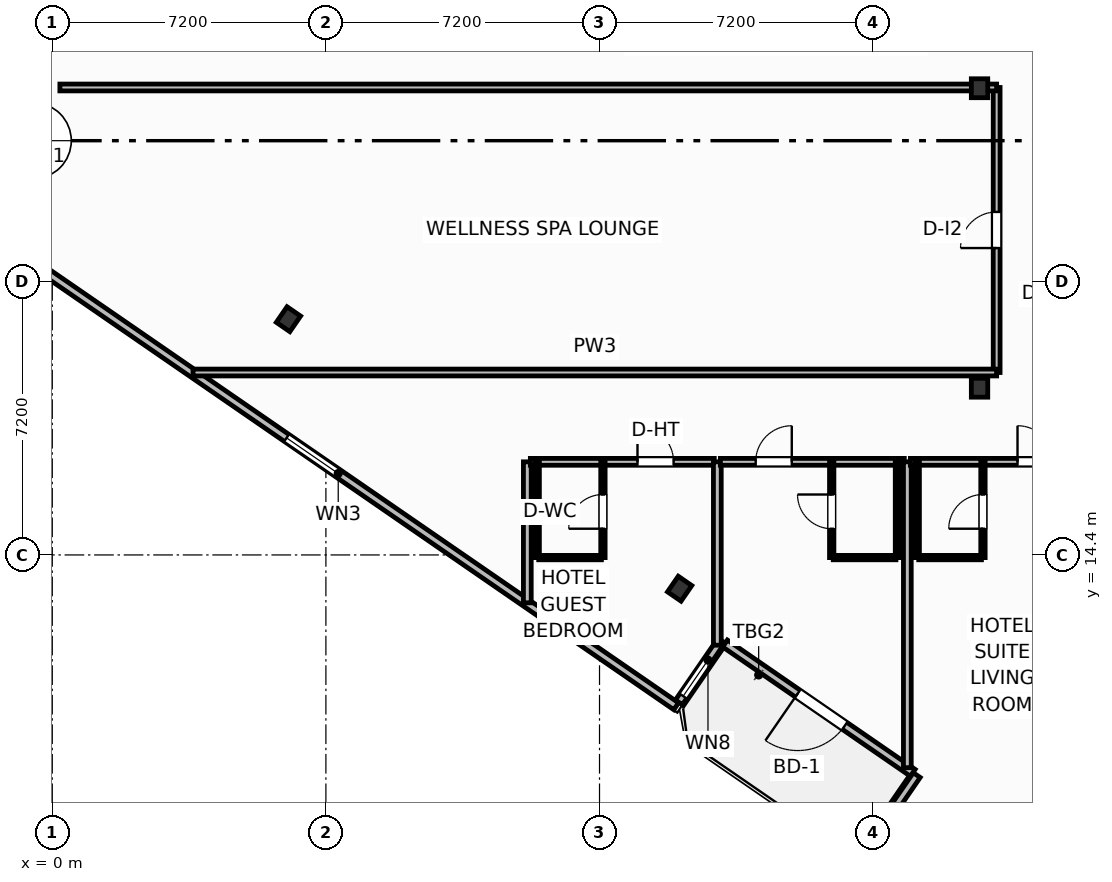
"""IFC4 building model, lengths in metres.
Left out: names, types, materials, properties, quantities, classifications, styles, units other than length and angle.
Written with IfcOpenShell. Run it as: python <this file> out.ifc"""

import sys

from ifc_helpers import new_model, si_unit, direction, frame, frame_2d, origin, origin_2d, place, context, subcontext, project, spatial, rectangle, i_section, extrude, element, fill, save


model = new_model("IFC4")
c1 = context("Model", 3, precision=1e-05, world=origin(), true_north=direction((0.0, 1.0)))
c2 = subcontext(c1, "Body", "Model", "MODEL_VIEW")
j1 = project(units=[si_unit("LENGTHUNIT", "METRE"), si_unit("PLANEANGLEUNIT", "RADIAN")], contexts=[c1])
p1 = place(None, origin())
s1 = spatial("IfcSite", under=j1, at=p1, CompositionType="ELEMENT")
p2 = place(p1, origin())
s2 = spatial("IfcBuilding", under=s1, at=p2, CompositionType="ELEMENT")
p3 = place(p2, frame((0.0, 0.0, 27.0)))
s3 = spatial("IfcBuildingStorey", under=s2, at=p3, CompositionType="ELEMENT", Elevation=27.0)
for number, where, z_axis, x_axis in (
    (1, (24.4, 18.8, 0.0), (0.0, 0.0, 1.0), (1.0, 0.0, 0.0)),
    (2, (24.4, 26.68, 0.0), (0.0, 0.0, 1.0), (1.0, 0.0, 0.0)),
):
    element("IfcColumn", number, at=place(p3, frame(where, z_axis=z_axis, x_axis=x_axis)), inside=s3, PredefinedType="COLUMN", context=c2, shape_type="SweptSolid", body=[
        extrude(i_section(OverallWidth=0.432, OverallDepth=0.498, WebThickness=0.056, FlangeThickness=0.089, FilletRadius=0.025, at=origin_2d()), origin(), (0.0, 0.0, 1.0), 3.7),
    ])
for number, where, z_axis, x_axis in (
    (3, (6.215, 20.603, -0.25), (0.0, 0.0, 1.0), (0.824, -0.567, 0.0)),
    (4, (16.509, 13.512, -0.25), (0.0, 0.0, 1.0), (0.824, -0.567, 0.0)),
):
    element("IfcColumn", number, at=place(p3, frame(where, z_axis=z_axis, x_axis=x_axis)), inside=s3, PredefinedType="COLUMN", context=c2, shape_type="SweptSolid", body=[
        extrude(i_section(OverallWidth=0.432, OverallDepth=0.498, WebThickness=0.056, FlangeThickness=0.089, FilletRadius=0.025, at=origin_2d()), origin(), (0.0, 0.0, 1.0), 3.95),
    ])
p4 = place(p3, frame((22.643, 8.667, 0.0), z_axis=(0.0, 0.0, 1.0), x_axis=(-0.823534636215, 0.567265989598, 0.0)))
e5 = element("IfcWall", 5, at=p4, inside=s3, PredefinedType="SOLIDWALL", context=c2, shape_type="SweptSolid", body=[
    extrude(rectangle(XDim=6.0, YDim=0.22, at=frame_2d((3.0, 0.0))), origin(), (0.0, 0.0, 1.0), 2.73),
])
p5 = place(p4, frame((2.176, 0.0, 0.0)))
e6 = element("IfcOpeningElement", 6, at=p5, cuts=e5, PredefinedType="OPENING", context=c2, shape_type="SweptSolid", body=[
    extrude(rectangle(XDim=1.5, YDim=2.25, at=frame_2d((0.75, 1.125))), frame((0.0, 0.12, 0.0), z_axis=(0.0, -1.0, 0.0), x_axis=(1.0, 0.0, 0.0)), (0.0, 0.0, 1.0), 0.24),
])
p6 = place(p3, frame((-2.728, 23.605, 0.0), z_axis=(0.0, 0.0, 1.0), x_axis=(0.823535075462, -0.567265351915, 0.0)))
e7 = element("IfcWall", 7, at=p6, inside=s3, PredefinedType="SOLIDWALL", context=c2, shape_type="SweptSolid", body=[
    extrude(rectangle(XDim=23.247, YDim=0.22, at=frame_2d((11.624, 0.0))), origin(), (0.0, 0.0, 1.0), 2.73),
])
p7 = place(p6, frame((10.799, 0.0, 0.8)))
e8 = element("IfcOpeningElement", 8, at=p7, cuts=e7, PredefinedType="OPENING", context=c2, shape_type="SweptSolid", body=[
    extrude(rectangle(XDim=1.65, YDim=1.65, at=frame_2d((0.825, 0.825))), frame((0.0, 0.12, 0.0), z_axis=(0.0, -1.0, 0.0), x_axis=(1.0, 0.0, 0.0)), (0.0, 0.0, 1.0), 0.24),
])
p8 = place(p3, frame((16.488, 10.521, 0.0), z_axis=(0.0, 0.0, 1.0), x_axis=(0.567131976434, 0.823626930902, 0.0)))
e9 = element("IfcWall", 9, at=p8, inside=s3, PredefinedType="SOLIDWALL", context=c2, shape_type="SweptSolid", body=[
    extrude(rectangle(XDim=1.975, YDim=0.22, at=frame_2d((0.988, 0.0))), origin(), (0.0, 0.0, 1.0), 2.73),
])
p9 = place(p8, frame((0.2, 0.0, 0.8)))
e10 = element("IfcOpeningElement", 10, at=p9, cuts=e9, PredefinedType="OPENING", context=c2, shape_type="SweptSolid", body=[
    extrude(rectangle(XDim=1.15, YDim=1.4, at=frame_2d((0.575, 0.7))), frame((0.0, 0.12, 0.0), z_axis=(0.0, -1.0, 0.0), x_axis=(1.0, 0.0, 0.0)), (0.0, 0.0, 1.0), 0.24),
])
p10 = place(p3, frame((22.747, 8.607, 0.0), z_axis=(0.0, 0.0, 1.0), x_axis=(-0.567219383419, -0.823566737474, 0.0)))
e11 = element("IfcWall", 11, at=p10, inside=s3, PredefinedType="SOLIDWALL", context=c2, shape_type="SweptSolid", body=[
    extrude(rectangle(XDim=2.1, YDim=0.22, at=frame_2d((1.05, 0.0))), origin(), (0.0, 0.0, 1.0), 2.73),
])
p11 = place(p3, frame((12.5, 13.14, 0.0), z_axis=(0.0, 0.0, 1.0), x_axis=(0.0, 1.0, 0.0)))
e12 = element("IfcWall", 12, at=p11, inside=s3, PredefinedType="PARTITIONING", context=c2, shape_type="SweptSolid", body=[
    extrude(rectangle(XDim=3.71, YDim=0.205, at=frame_2d((1.855, 0.0))), origin(), (0.0, 0.0, 1.0), 3.45),
])
p12 = place(p3, frame((12.58, 16.85, 0.0), z_axis=(0.0, 0.0, 1.0), x_axis=(1.0, 0.0, 0.0)))
e13 = element("IfcWall", 13, at=p12, inside=s3, PredefinedType="PARTITIONING", context=c2, shape_type="SweptSolid", body=[
    extrude(rectangle(XDim=4.84, YDim=0.18, at=frame_2d((2.42, 0.0))), origin(), (0.0, 0.0, 1.0), 3.45),
])
p13 = place(p12, frame((2.819, 0.0, 0.0)))
e14 = element("IfcOpeningElement", 14, at=p13, cuts=e13, PredefinedType="OPENING", context=c2, shape_type="SweptSolid", body=[
    extrude(rectangle(XDim=0.95, YDim=2.15, at=frame_2d((0.475, 1.075))), frame((0.0, 0.1, 0.0), z_axis=(0.0, -1.0, 0.0), x_axis=(1.0, 0.0, 0.0)), (0.0, 0.0, 1.0), 0.2),
])
p14 = place(p3, frame((12.8, 14.33, 0.0), z_axis=(0.0, 0.0, 1.0), x_axis=(1.0, 0.0, 0.0)))
e15 = element("IfcWall", 15, at=p14, inside=s3, PredefinedType="PARTITIONING", context=c2, shape_type="SweptSolid", body=[
    extrude(rectangle(XDim=1.65, YDim=0.115, at=frame_2d((0.825, 0.0))), origin(), (0.0, 0.0, 1.0), 3.45),
])
p15 = place(p3, frame((14.49, 14.33, 0.0), z_axis=(0.0, 0.0, 1.0), x_axis=(0.0, 1.0, 0.0)))
e16 = element("IfcWall", 16, at=p15, inside=s3, PredefinedType="PARTITIONING", context=c2, shape_type="SweptSolid", body=[
    extrude(rectangle(XDim=2.52, YDim=0.115, at=frame_2d((1.26, 0.0))), origin(), (0.0, 0.0, 1.0), 3.45),
])
p16 = place(p15, frame((0.76, 0.0, 0.0)))
e17 = element("IfcOpeningElement", 17, at=p16, cuts=e16, PredefinedType="OPENING", context=c2, shape_type="SweptSolid", body=[
    extrude(rectangle(XDim=0.9, YDim=2.05, at=frame_2d((0.45, 1.025))), frame((0.0, 0.067, 0.0), z_axis=(0.0, -1.0, 0.0), x_axis=(1.0, 0.0, 0.0)), (0.0, 0.0, 1.0), 0.135),
])
p17 = place(p3, frame((12.76, 14.33, 0.0), z_axis=(0.0, 0.0, 1.0), x_axis=(0.0, 1.0, 0.0)))
e18 = element("IfcWall", 18, at=p17, inside=s3, PredefinedType="PARTITIONING", context=c2, shape_type="SweptSolid", body=[
    extrude(rectangle(XDim=2.52, YDim=0.115, at=frame_2d((1.26, 0.0))), origin(), (0.0, 0.0, 1.0), 3.45),
])
p18 = place(p3, frame((17.5, 12.025, 0.0), z_axis=(0.0, 0.0, 1.0), x_axis=(0.0, 1.0, 0.0)))
e19 = element("IfcWall", 19, at=p18, inside=s3, PredefinedType="PARTITIONING", context=c2, shape_type="SweptSolid", body=[
    extrude(rectangle(XDim=4.825, YDim=0.205, at=frame_2d((2.413, 0.0))), origin(), (0.0, 0.0, 1.0), 3.45),
])
p19 = place(p3, frame((17.58, 16.85, 0.0), z_axis=(0.0, 0.0, 1.0), x_axis=(1.0, 0.0, 0.0)))
e20 = element("IfcWall", 20, at=p19, inside=s3, PredefinedType="PARTITIONING", context=c2, shape_type="SweptSolid", body=[
    extrude(rectangle(XDim=4.84, YDim=0.18, at=frame_2d((2.42, 0.0))), origin(), (0.0, 0.0, 1.0), 3.45),
])
p20 = place(p19, frame((0.929, 0.0, 0.0)))
e21 = element("IfcOpeningElement", 21, at=p20, cuts=e20, PredefinedType="OPENING", context=c2, shape_type="SweptSolid", body=[
    extrude(rectangle(XDim=0.95, YDim=2.15, at=frame_2d((0.475, 1.075))), frame((0.0, 0.1, 0.0), z_axis=(0.0, -1.0, 0.0), x_axis=(1.0, 0.0, 0.0)), (0.0, 0.0, 1.0), 0.2),
])
p21 = place(p3, frame((20.55, 14.33, 0.0), z_axis=(0.0, 0.0, 1.0), x_axis=(1.0, 0.0, 0.0)))
e22 = element("IfcWall", 22, at=p21, inside=s3, PredefinedType="PARTITIONING", context=c2, shape_type="SweptSolid", body=[
    extrude(rectangle(XDim=1.65, YDim=0.115, at=frame_2d((0.825, 0.0))), origin(), (0.0, 0.0, 1.0), 3.45),
])
p22 = place(p3, frame((20.51, 14.33, 0.0), z_axis=(0.0, 0.0, 1.0), x_axis=(0.0, 1.0, 0.0)))
e23 = element("IfcWall", 23, at=p22, inside=s3, PredefinedType="PARTITIONING", context=c2, shape_type="SweptSolid", body=[
    extrude(rectangle(XDim=2.52, YDim=0.115, at=frame_2d((1.26, 0.0))), origin(), (0.0, 0.0, 1.0), 3.45),
])
p23 = place(p22, frame((0.76, 0.0, 0.0)))
e24 = element("IfcOpeningElement", 24, at=p23, cuts=e23, PredefinedType="OPENING", context=c2, shape_type="SweptSolid", body=[
    extrude(rectangle(XDim=0.9, YDim=2.05, at=frame_2d((0.45, 1.025))), frame((0.0, 0.067, 0.0), z_axis=(0.0, -1.0, 0.0), x_axis=(1.0, 0.0, 0.0)), (0.0, 0.0, 1.0), 0.135),
])
p24 = place(p3, frame((22.24, 14.33, 0.0), z_axis=(0.0, 0.0, 1.0), x_axis=(0.0, 1.0, 0.0)))
e25 = element("IfcWall", 25, at=p24, inside=s3, PredefinedType="PARTITIONING", context=c2, shape_type="SweptSolid", body=[
    extrude(rectangle(XDim=2.52, YDim=0.115, at=frame_2d((1.26, 0.0))), origin(), (0.0, 0.0, 1.0), 3.45),
])
p25 = place(p3, frame((22.5, 8.802, 0.0), z_axis=(0.0, 0.0, 1.0), x_axis=(0.0, 1.0, 0.0)))
e26 = element("IfcWall", 26, at=p25, inside=s3, PredefinedType="PARTITIONING", context=c2, shape_type="SweptSolid", body=[
    extrude(rectangle(XDim=8.048, YDim=0.205, at=frame_2d((4.024, 0.0))), origin(), (0.0, 0.0, 1.0), 3.45),
])
p26 = place(p3, frame((22.58, 16.85, 0.0), z_axis=(0.0, 0.0, 1.0), x_axis=(1.0, 0.0, 0.0)))
e27 = element("IfcWall", 27, at=p26, inside=s3, PredefinedType="PARTITIONING", context=c2, shape_type="SweptSolid", body=[
    extrude(rectangle(XDim=4.84, YDim=0.18, at=frame_2d((2.42, 0.0))), origin(), (0.0, 0.0, 1.0), 3.45),
])
p27 = place(p26, frame((2.819, 0.0, 0.0)))
e28 = element("IfcOpeningElement", 28, at=p27, cuts=e27, PredefinedType="OPENING", context=c2, shape_type="SweptSolid", body=[
    extrude(rectangle(XDim=0.95, YDim=2.15, at=frame_2d((0.475, 1.075))), frame((0.0, 0.1, 0.0), z_axis=(0.0, -1.0, 0.0), x_axis=(1.0, 0.0, 0.0)), (0.0, 0.0, 1.0), 0.2),
])
p28 = place(p3, frame((22.8, 14.33, 0.0), z_axis=(0.0, 0.0, 1.0), x_axis=(1.0, 0.0, 0.0)))
e29 = element("IfcWall", 29, at=p28, inside=s3, PredefinedType="PARTITIONING", context=c2, shape_type="SweptSolid", body=[
    extrude(rectangle(XDim=1.65, YDim=0.115, at=frame_2d((0.825, 0.0))), origin(), (0.0, 0.0, 1.0), 3.45),
])
p29 = place(p3, frame((24.49, 14.33, 0.0), z_axis=(0.0, 0.0, 1.0), x_axis=(0.0, 1.0, 0.0)))
e30 = element("IfcWall", 30, at=p29, inside=s3, PredefinedType="PARTITIONING", context=c2, shape_type="SweptSolid", body=[
    extrude(rectangle(XDim=2.52, YDim=0.115, at=frame_2d((1.26, 0.0))), origin(), (0.0, 0.0, 1.0), 3.45),
])
p30 = place(p29, frame((0.76, 0.0, 0.0)))
e31 = element("IfcOpeningElement", 31, at=p30, cuts=e30, PredefinedType="OPENING", context=c2, shape_type="SweptSolid", body=[
    extrude(rectangle(XDim=0.9, YDim=2.05, at=frame_2d((0.45, 1.025))), frame((0.0, 0.067, 0.0), z_axis=(0.0, -1.0, 0.0), x_axis=(1.0, 0.0, 0.0)), (0.0, 0.0, 1.0), 0.135),
])
p31 = place(p3, frame((22.76, 14.33, 0.0), z_axis=(0.0, 0.0, 1.0), x_axis=(0.0, 1.0, 0.0)))
e32 = element("IfcWall", 32, at=p31, inside=s3, PredefinedType="PARTITIONING", context=c2, shape_type="SweptSolid", body=[
    extrude(rectangle(XDim=2.52, YDim=0.115, at=frame_2d((1.26, 0.0))), origin(), (0.0, 0.0, 1.0), 3.45),
])
p32 = place(p3, frame((24.85, 19.2, 0.0), z_axis=(0.0, 0.0, 1.0), x_axis=(0.0, 1.0, 0.0)))
e33 = element("IfcWall", 33, at=p32, inside=s3, PredefinedType="PARTITIONING", context=c2, shape_type="SweptSolid", body=[
    extrude(rectangle(XDim=7.5, YDim=0.18, at=frame_2d((3.75, 0.0))), origin(), (0.0, 0.0, 1.0), 3.45),
])
p33 = place(p32, frame((3.275, 0.0, 0.0)))
e34 = element("IfcOpeningElement", 34, at=p33, cuts=e33, PredefinedType="OPENING", context=c2, shape_type="SweptSolid", body=[
    extrude(rectangle(XDim=0.95, YDim=2.05, at=frame_2d((0.475, 1.025))), frame((0.0, 0.1, 0.0), z_axis=(0.0, -1.0, 0.0), x_axis=(1.0, 0.0, 0.0)), (0.0, 0.0, 1.0), 0.2),
])
p34 = place(p3, frame((3.703, 19.2, 0.0), z_axis=(0.0, 0.0, 1.0), x_axis=(1.0, 0.0, 0.0)))
e35 = element("IfcWall", 35, at=p34, inside=s3, PredefinedType="PARTITIONING", context=c2, shape_type="SweptSolid", body=[
    extrude(rectangle(XDim=21.147, YDim=0.18, at=frame_2d((10.574, 0.0))), origin(), (0.0, 0.0, 1.0), 2.58),
])
p35 = place(p3, frame((0.2, 26.7, 0.0), z_axis=(0.0, 0.0, 1.0), x_axis=(1.0, 0.0, 0.0)))
e36 = element("IfcWall", 36, at=p35, inside=s3, PredefinedType="PARTITIONING", context=c2, shape_type="SweptSolid", body=[
    extrude(rectangle(XDim=24.65, YDim=0.18, at=frame_2d((12.325, 0.0))), origin(), (0.0, 0.0, 1.0), 2.662),
])
p36 = place(p5, origin())
e37 = element("IfcDoor", 37, at=p36, inside=s3, OperationType="SINGLE_SWING_RIGHT", PredefinedType="DOOR", context=c2, shape_type="SweptSolid", body=[
    extrude(rectangle(XDim=1.5, YDim=2.25, at=frame_2d((0.75, 1.125))), frame((0.0, 0.025, 0.0), z_axis=(0.0, -1.0, 0.0), x_axis=(1.0, 0.0, 0.0)), (0.0, 0.0, 1.0), 0.05),
])
fill(e6, e37)
p37 = place(p7, origin())
e38 = element("IfcWindow", 38, at=p37, inside=s3, PartitioningType="SINGLE_PANEL", PredefinedType="WINDOW", context=c2, shape_type="SweptSolid", body=[
    extrude(rectangle(XDim=1.65, YDim=1.65, at=frame_2d((0.825, 0.825))), frame((0.0, 0.03, 0.0), z_axis=(0.0, -1.0, 0.0), x_axis=(1.0, 0.0, 0.0)), (0.0, 0.0, 1.0), 0.06),
])
fill(e8, e38)
p38 = place(p13, origin())
e39 = element("IfcDoor", 39, at=p38, inside=s3, OperationType="SINGLE_SWING_LEFT", PredefinedType="DOOR", context=c2, shape_type="SweptSolid", body=[
    extrude(rectangle(XDim=0.95, YDim=2.15, at=frame_2d((0.475, 1.075))), frame((0.0, 0.025, 0.0), z_axis=(0.0, -1.0, 0.0), x_axis=(1.0, 0.0, 0.0)), (0.0, 0.0, 1.0), 0.05),
])
fill(e14, e39)
p39 = place(p16, origin())
e40 = element("IfcDoor", 40, at=p39, inside=s3, OperationType="SINGLE_SWING_LEFT", PredefinedType="DOOR", context=c2, shape_type="SweptSolid", body=[
    extrude(rectangle(XDim=0.9, YDim=2.05, at=frame_2d((0.45, 1.025))), frame((0.0, 0.025, 0.0), z_axis=(0.0, -1.0, 0.0), x_axis=(1.0, 0.0, 0.0)), (0.0, 0.0, 1.0), 0.05),
])
fill(e17, e40)
p40 = place(p20, origin())
e41 = element("IfcDoor", 41, at=p40, inside=s3, OperationType="SINGLE_SWING_RIGHT", PredefinedType="DOOR", context=c2, shape_type="SweptSolid", body=[
    extrude(rectangle(XDim=0.95, YDim=2.15, at=frame_2d((0.475, 1.075))), frame((0.0, 0.025, 0.0), z_axis=(0.0, -1.0, 0.0), x_axis=(1.0, 0.0, 0.0)), (0.0, 0.0, 1.0), 0.05),
])
fill(e21, e41)
p41 = place(p23, origin())
e42 = element("IfcDoor", 42, at=p41, inside=s3, OperationType="SINGLE_SWING_RIGHT", PredefinedType="DOOR", context=c2, shape_type="SweptSolid", body=[
    extrude(rectangle(XDim=0.9, YDim=2.05, at=frame_2d((0.45, 1.025))), frame((0.0, 0.025, 0.0), z_axis=(0.0, -1.0, 0.0), x_axis=(1.0, 0.0, 0.0)), (0.0, 0.0, 1.0), 0.05),
])
fill(e24, e42)
p42 = place(p27, origin())
e43 = element("IfcDoor", 43, at=p42, inside=s3, OperationType="SINGLE_SWING_LEFT", PredefinedType="DOOR", context=c2, shape_type="SweptSolid", body=[
    extrude(rectangle(XDim=0.95, YDim=2.15, at=frame_2d((0.475, 1.075))), frame((0.0, 0.025, 0.0), z_axis=(0.0, -1.0, 0.0), x_axis=(1.0, 0.0, 0.0)), (0.0, 0.0, 1.0), 0.05),
])
fill(e28, e43)
p43 = place(p30, origin())
e44 = element("IfcDoor", 44, at=p43, inside=s3, OperationType="SINGLE_SWING_LEFT", PredefinedType="DOOR", context=c2, shape_type="SweptSolid", body=[
    extrude(rectangle(XDim=0.9, YDim=2.05, at=frame_2d((0.45, 1.025))), frame((0.0, 0.025, 0.0), z_axis=(0.0, -1.0, 0.0), x_axis=(1.0, 0.0, 0.0)), (0.0, 0.0, 1.0), 0.05),
])
fill(e31, e44)
p44 = place(p33, origin())
e45 = element("IfcDoor", 45, at=p44, inside=s3, OperationType="SINGLE_SWING_LEFT", PredefinedType="DOOR", context=c2, shape_type="SweptSolid", body=[
    extrude(rectangle(XDim=0.95, YDim=2.05, at=frame_2d((0.475, 1.025))), frame((0.0, 0.025, 0.0), z_axis=(0.0, -1.0, 0.0), x_axis=(1.0, 0.0, 0.0)), (0.0, 0.0, 1.0), 0.05),
])
fill(e34, e45)
p45 = place(p9, origin())
e46 = element("IfcWindow", 46, at=p45, inside=s3, PartitioningType="SINGLE_PANEL", PredefinedType="WINDOW", context=c2, shape_type="SweptSolid", body=[
    extrude(rectangle(XDim=1.15, YDim=1.4, at=frame_2d((0.575, 0.7))), frame((0.0, 0.03, 0.0), z_axis=(0.0, -1.0, 0.0), x_axis=(1.0, 0.0, 0.0)), (0.0, 0.0, 1.0), 0.06),
])
fill(e10, e46)
save(model, sys.argv[1])
